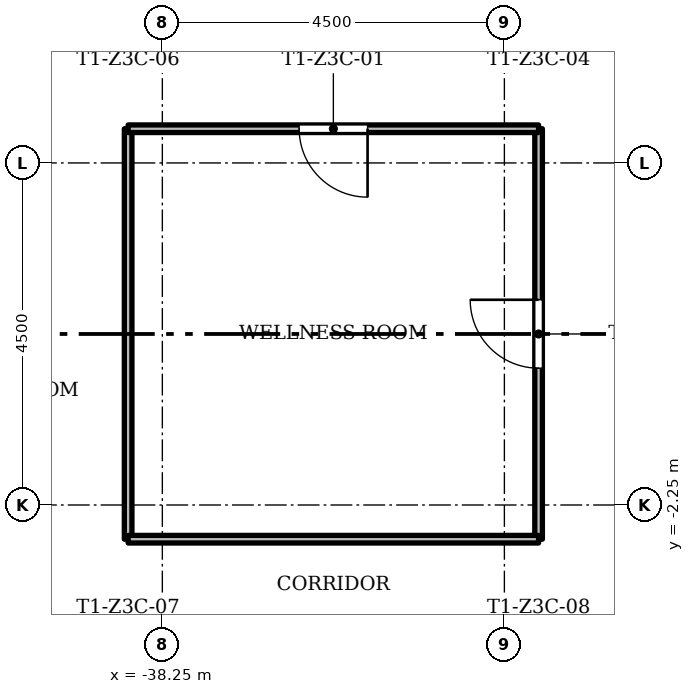
"""IFC4 building model, lengths in metres.
Left out: names, types, materials, properties, quantities, classifications, styles, units other than length and angle.
Written with IfcOpenShell. Run it as: python <this file> out.ifc"""

import sys

from ifc_helpers import new_model, si_unit, direction, frame, frame_2d, origin, place, context, subcontext, project, spatial, rectangle, extrude, element, fill, save


model = new_model("IFC4")
c1 = context("Model", 3, precision=1e-05, world=origin(), true_north=direction((0.0, 1.0)))
c2 = subcontext(c1, "Body", "Model", "MODEL_VIEW")
j1 = project(units=[si_unit("LENGTHUNIT", "METRE"), si_unit("PLANEANGLEUNIT", "RADIAN")], contexts=[c1])
p1 = place(None, origin())
s1 = spatial("IfcSite", under=j1, at=p1, CompositionType="ELEMENT")
p2 = place(p1, origin())
s2 = spatial("IfcBuilding", under=s1, at=p2, CompositionType="ELEMENT")
p3 = place(p2, frame((0.0, 0.0, 157.5)))
s3 = spatial("IfcBuildingStorey", under=s2, at=p3, CompositionType="ELEMENT", Elevation=157.5)
p4 = place(p3, frame((-38.7, -2.7, 0.0), z_axis=(0.0, 0.0, 1.0), x_axis=(0.0, 1.0, 0.0)))
e1 = element("IfcWall", 1, at=p4, inside=s3, PredefinedType="PARTITIONING", context=c2, shape_type="SweptSolid", body=[
    extrude(rectangle(XDim=5.4, YDim=0.1, at=frame_2d((2.7, 0.0))), origin(), (0.0, 0.0, 1.0), 3.0),
])
p5 = place(p3, frame((-33.3, -2.7, 0.0), z_axis=(0.0, 0.0, 1.0), x_axis=(0.0, 1.0, 0.0)))
e2 = element("IfcWall", 2, at=p5, inside=s3, PredefinedType="PARTITIONING", context=c2, shape_type="SweptSolid", body=[
    extrude(rectangle(XDim=5.4, YDim=0.1, at=frame_2d((2.7, 0.0))), origin(), (0.0, 0.0, 1.0), 3.0),
])
p6 = place(p5, frame((2.25, 0.0, 0.0)))
e3 = element("IfcOpeningElement", 3, at=p6, cuts=e2, PredefinedType="OPENING", context=c2, shape_type="SweptSolid", body=[
    extrude(rectangle(XDim=0.9, YDim=2.1, at=frame_2d((0.45, 1.05))), frame((0.0, 0.06, 0.0), z_axis=(0.0, -1.0, 0.0), x_axis=(1.0, 0.0, 0.0)), (0.0, 0.0, 1.0), 0.12),
])
p7 = place(p3, frame((-38.7, -2.7, 0.0), z_axis=(0.0, 0.0, 1.0), x_axis=(1.0, 0.0, 0.0)))
e4 = element("IfcWall", 4, at=p7, inside=s3, PredefinedType="PARTITIONING", context=c2, shape_type="SweptSolid", body=[
    extrude(rectangle(XDim=5.4, YDim=0.1, at=frame_2d((2.7, 0.0))), origin(), (0.0, 0.0, 1.0), 3.0),
])
p8 = place(p3, frame((-38.7, 2.7, 0.0), z_axis=(0.0, 0.0, 1.0), x_axis=(1.0, 0.0, 0.0)))
e5 = element("IfcWall", 5, at=p8, inside=s3, PredefinedType="PARTITIONING", context=c2, shape_type="SweptSolid", body=[
    extrude(rectangle(XDim=5.4, YDim=0.1, at=frame_2d((2.7, 0.0))), origin(), (0.0, 0.0, 1.0), 3.0),
])
p9 = place(p8, frame((2.25, 0.0, 0.0)))
e6 = element("IfcOpeningElement", 6, at=p9, cuts=e5, PredefinedType="OPENING", context=c2, shape_type="SweptSolid", body=[
    extrude(rectangle(XDim=0.9, YDim=2.1, at=frame_2d((0.45, 1.05))), frame((0.0, 0.06, 0.0), z_axis=(0.0, -1.0, 0.0), x_axis=(1.0, 0.0, 0.0)), (0.0, 0.0, 1.0), 0.12),
])
p10 = place(p9, origin())
e7 = element("IfcDoor", 7, at=p10, inside=s3, OperationType="SINGLE_SWING_RIGHT", PredefinedType="DOOR", context=c2, shape_type="SweptSolid", body=[
    extrude(rectangle(XDim=0.9, YDim=2.1, at=frame_2d((0.45, 1.05))), frame((0.0, 0.025, 0.0), z_axis=(0.0, -1.0, 0.0), x_axis=(1.0, 0.0, 0.0)), (0.0, 0.0, 1.0), 0.05),
])
fill(e6, e7)
p11 = place(p6, origin())
e8 = element("IfcDoor", 8, at=p11, inside=s3, OperationType="SINGLE_SWING_LEFT", PredefinedType="DOOR", context=c2, shape_type="SweptSolid", body=[
    extrude(rectangle(XDim=0.9, YDim=2.1, at=frame_2d((0.45, 1.05))), frame((0.0, 0.025, 0.0), z_axis=(0.0, -1.0, 0.0), x_axis=(1.0, 0.0, 0.0)), (0.0, 0.0, 1.0), 0.05),
])
fill(e3, e8)
save(model, sys.argv[1])
